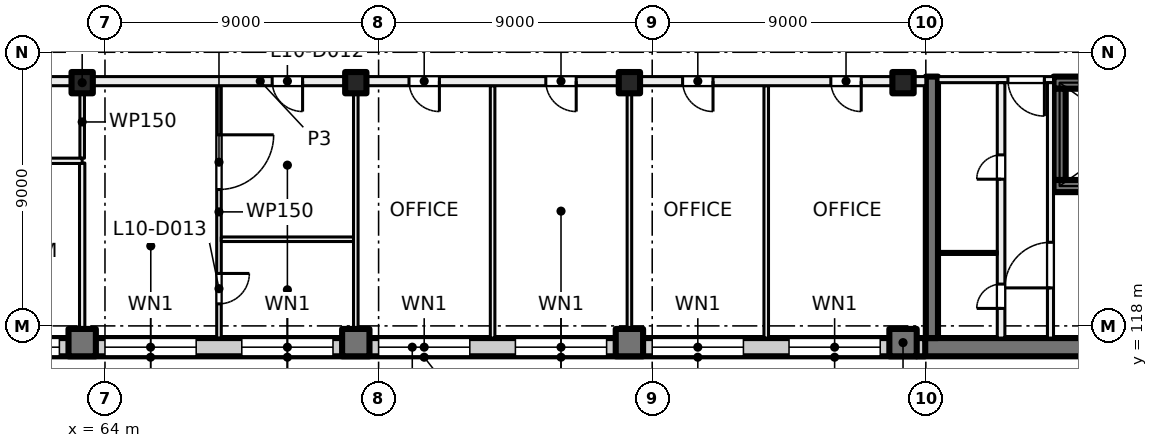
"""IFC4 building model, lengths in metres.
Left out: names, types, materials, properties, quantities, classifications, styles, units other than length and angle.
Written with IfcOpenShell. Run it as: python <this file> out.ifc"""

import sys

from ifc_helpers import new_model, si_unit, direction, frame, frame_2d, origin, origin_2d, place, context, subcontext, project, spatial, rectangle, extrude, element, fill, save


model = new_model("IFC4")
c1 = context("Model", 3, precision=1e-05, world=origin(), true_north=direction((0.0, 1.0)))
c2 = subcontext(c1, "Body", "Model", "MODEL_VIEW")
j1 = project(units=[si_unit("LENGTHUNIT", "METRE"), si_unit("PLANEANGLEUNIT", "RADIAN")], contexts=[c1])
p1 = place(None, origin())
s1 = spatial("IfcSite", under=j1, at=p1, CompositionType="ELEMENT")
p2 = place(p1, origin())
s2 = spatial("IfcBuilding", under=s1, at=p2, CompositionType="ELEMENT")
p3 = place(p2, frame((0.0, 0.0, 47.5)))
s3 = spatial("IfcBuildingStorey", under=s2, at=p3, CompositionType="ELEMENT", Elevation=47.5)
for number, where, z_axis, x_axis in (
    (1, (63.25, 126.0, 0.0), (0.0, 0.0, 1.0), (1.0, 0.0, 0.0)),
    (2, (72.25, 126.0, 0.0), (0.0, 0.0, 1.0), (1.0, 0.0, 0.0)),
    (3, (81.25, 126.0, 0.0), (0.0, 0.0, 1.0), (1.0, 0.0, 0.0)),
    (4, (90.25, 126.0, 0.0), (0.0, 0.0, 1.0), (1.0, 0.0, 0.0)),
):
    element("IfcColumn", number, at=place(p3, frame(where, z_axis=z_axis, x_axis=x_axis)), inside=s3, PredefinedType="COLUMN", context=c2, shape_type="SweptSolid", body=[
        extrude(rectangle(XDim=0.7, YDim=0.7, at=origin_2d()), origin(), (0.0, 0.0, 1.0), 4.0),
    ])
for number, where, z_axis, x_axis in (
    (5, (63.25, 117.45, 0.0), (0.0, 0.0, 1.0), (1.0, 0.0, 0.0)),
    (6, (72.25, 117.45, 0.0), (0.0, 0.0, 1.0), (1.0, 0.0, 0.0)),
    (7, (81.25, 117.45, 0.0), (0.0, 0.0, 1.0), (1.0, 0.0, 0.0)),
    (8, (90.25, 117.45, 0.0), (0.0, 0.0, 1.0), (1.0, 0.0, 0.0)),
):
    element("IfcColumn", number, at=place(p3, frame(where, z_axis=z_axis, x_axis=x_axis)), inside=s3, PredefinedType="COLUMN", context=c2, shape_type="SweptSolid", body=[
        extrude(rectangle(XDim=0.9, YDim=0.9, at=origin_2d()), origin(), (0.0, 0.0, 1.0), 4.0),
    ])
p4 = place(p3, frame((99.6, 117.3, 0.0), z_axis=(0.0, 0.0, 1.0), x_axis=(-1.0, 0.0, 0.0)))
e9 = element("IfcWall", 9, at=p4, inside=s3, PredefinedType="SHEAR", context=c2, shape_type="SweptSolid", body=[
    extrude(rectangle(XDim=8.9, YDim=0.6, at=frame_2d((4.45, 0.0))), origin(), (0.0, 0.0, 1.0), 4.0),
])
p5 = place(p3, frame((107.4, 126.0, 0.0), z_axis=(0.0, 0.0, 1.0), x_axis=(-1.0, 0.0, 0.0)))
e10 = element("IfcWall", 10, at=p5, inside=s3, PredefinedType="SHEAR", context=c2, shape_type="SweptSolid", body=[
    extrude(rectangle(XDim=12.2, YDim=0.4, at=frame_2d((6.1, 0.0))), origin(), (0.0, 0.0, 1.0), 4.0),
])
p6 = place(p5, frame((10.25, 0.0, 0.0)))
e11 = element("IfcOpeningElement", 11, at=p6, cuts=e10, PredefinedType="OPENING", context=c2, shape_type="SweptSolid", body=[
    extrude(rectangle(XDim=1.1, YDim=2.1, at=frame_2d((0.55, 1.05))), frame((0.0, 0.21, 0.0), z_axis=(0.0, -1.0, 0.0), x_axis=(1.0, 0.0, 0.0)), (0.0, 0.0, 1.0), 0.42),
])
p7 = place(p5, frame((0.6, 0.0, 0.0)))
e12 = element("IfcOpeningElement", 12, at=p7, cuts=e10, PredefinedType="OPENING", context=c2, shape_type="SweptSolid", body=[
    extrude(rectangle(XDim=1.0, YDim=2.1, at=frame_2d((0.5, 1.05))), frame((0.0, 0.21, 0.0), z_axis=(0.0, -1.0, 0.0), x_axis=(1.0, 0.0, 0.0)), (0.0, 0.0, 1.0), 0.42),
])
p8 = place(p3, frame((107.4, 122.6, 0.0), z_axis=(0.0, 0.0, 1.0), x_axis=(-1.0, 0.0, 0.0)))
e13 = element("IfcWall", 13, at=p8, inside=s3, PredefinedType="SHEAR", context=c2, shape_type="SweptSolid", body=[
    extrude(rectangle(XDim=12.2, YDim=0.4, at=frame_2d((6.1, 0.0))), origin(), (0.0, 0.0, 1.0), 4.0),
])
p9 = place(p8, frame((7.9, 0.0, 0.0)))
e14 = element("IfcOpeningElement", 14, at=p9, cuts=e13, PredefinedType="OPENING", context=c2, shape_type="SweptSolid", body=[
    extrude(rectangle(XDim=1.1, YDim=2.1, at=frame_2d((0.55, 1.05))), frame((0.0, 0.21, 0.0), z_axis=(0.0, -1.0, 0.0), x_axis=(1.0, 0.0, 0.0)), (0.0, 0.0, 1.0), 0.42),
])
p10 = place(p3, frame((95.4, 125.8, 0.0), z_axis=(0.0, 0.0, 1.0), x_axis=(0.0, -1.0, 0.0)))
e15 = element("IfcWall", 15, at=p10, inside=s3, PredefinedType="SHEAR", context=c2, shape_type="SweptSolid", body=[
    extrude(rectangle(XDim=3.0, YDim=0.4, at=frame_2d((1.5, 0.0))), origin(), (0.0, 0.0, 1.0), 4.0),
])
p11 = place(p3, frame((91.2, 126.2, 0.0), z_axis=(0.0, 0.0, 1.0), x_axis=(0.0, -1.0, 0.0)))
e16 = element("IfcWall", 16, at=p11, inside=s3, PredefinedType="SHEAR", context=c2, shape_type="SweptSolid", body=[
    extrude(rectangle(XDim=8.6, YDim=0.4, at=frame_2d((4.3, 0.0))), origin(), (0.0, 0.0, 1.0), 4.0),
])
p12 = place(p3, frame((90.98, 117.3, 0.0), z_axis=(0.0, 0.0, 1.0), x_axis=(-1.0, 0.0, 0.0)))
e17 = element("IfcWall", 17, at=p12, inside=s3, PredefinedType="SOLIDWALL", context=c2, shape_type="SweptSolid", body=[
    extrude(rectangle(XDim=33.745, YDim=0.6, at=frame_2d((16.873, 0.0))), origin(), (0.0, 0.0, 1.0), 3.625),
])
p13 = place(p12, frame((1.48, 0.0, 0.9)))
e18 = element("IfcOpeningElement", 18, at=p13, cuts=e17, PredefinedType="OPENING", context=c2, shape_type="SweptSolid", body=[
    extrude(rectangle(XDim=3.0, YDim=2.4, at=frame_2d((1.5, 1.2))), frame((0.0, 0.31, 0.0), z_axis=(0.0, -1.0, 0.0), x_axis=(1.0, 0.0, 0.0)), (0.0, 0.0, 1.0), 0.62),
])
p14 = place(p12, frame((5.98, 0.0, 0.9)))
e19 = element("IfcOpeningElement", 19, at=p14, cuts=e17, PredefinedType="OPENING", context=c2, shape_type="SweptSolid", body=[
    extrude(rectangle(XDim=3.0, YDim=2.4, at=frame_2d((1.5, 1.2))), frame((0.0, 0.31, 0.0), z_axis=(0.0, -1.0, 0.0), x_axis=(1.0, 0.0, 0.0)), (0.0, 0.0, 1.0), 0.62),
])
p15 = place(p12, frame((10.48, 0.0, 0.9)))
e20 = element("IfcOpeningElement", 20, at=p15, cuts=e17, PredefinedType="OPENING", context=c2, shape_type="SweptSolid", body=[
    extrude(rectangle(XDim=3.0, YDim=2.4, at=frame_2d((1.5, 1.2))), frame((0.0, 0.31, 0.0), z_axis=(0.0, -1.0, 0.0), x_axis=(1.0, 0.0, 0.0)), (0.0, 0.0, 1.0), 0.62),
])
p16 = place(p12, frame((14.98, 0.0, 0.9)))
e21 = element("IfcOpeningElement", 21, at=p16, cuts=e17, PredefinedType="OPENING", context=c2, shape_type="SweptSolid", body=[
    extrude(rectangle(XDim=3.0, YDim=2.4, at=frame_2d((1.5, 1.2))), frame((0.0, 0.31, 0.0), z_axis=(0.0, -1.0, 0.0), x_axis=(1.0, 0.0, 0.0)), (0.0, 0.0, 1.0), 0.62),
])
p17 = place(p12, frame((19.48, 0.0, 0.9)))
e22 = element("IfcOpeningElement", 22, at=p17, cuts=e17, PredefinedType="OPENING", context=c2, shape_type="SweptSolid", body=[
    extrude(rectangle(XDim=3.0, YDim=2.4, at=frame_2d((1.5, 1.2))), frame((0.0, 0.31, 0.0), z_axis=(0.0, -1.0, 0.0), x_axis=(1.0, 0.0, 0.0)), (0.0, 0.0, 1.0), 0.62),
])
p18 = place(p12, frame((23.98, 0.0, 0.9)))
e23 = element("IfcOpeningElement", 23, at=p18, cuts=e17, PredefinedType="OPENING", context=c2, shape_type="SweptSolid", body=[
    extrude(rectangle(XDim=3.0, YDim=2.4, at=frame_2d((1.5, 1.2))), frame((0.0, 0.31, 0.0), z_axis=(0.0, -1.0, 0.0), x_axis=(1.0, 0.0, 0.0)), (0.0, 0.0, 1.0), 0.62),
])
p19 = place(p12, frame((28.48, 0.0, 0.9)))
e24 = element("IfcOpeningElement", 24, at=p19, cuts=e17, PredefinedType="OPENING", context=c2, shape_type="SweptSolid", body=[
    extrude(rectangle(XDim=3.0, YDim=2.4, at=frame_2d((1.5, 1.2))), frame((0.0, 0.31, 0.0), z_axis=(0.0, -1.0, 0.0), x_axis=(1.0, 0.0, 0.0)), (0.0, 0.0, 1.0), 0.62),
])
p20 = place(p3, frame((95.2, 126.1, 0.0), z_axis=(0.0, 0.0, 1.0), x_axis=(-1.0, 0.0, 0.0)))
e25 = element("IfcWall", 25, at=p20, inside=s3, PredefinedType="PARTITIONING", context=c2, shape_type="SweptSolid", body=[
    extrude(rectangle(XDim=3.8, YDim=0.2, at=frame_2d((1.9, 0.0))), origin(), (0.0, 0.0, 1.0), 3.625),
])
p21 = place(p20, frame((0.3, 0.0, 0.0)))
e26 = element("IfcOpeningElement", 26, at=p21, cuts=e25, PredefinedType="OPENING", context=c2, shape_type="SweptSolid", body=[
    extrude(rectangle(XDim=1.2, YDim=2.1, at=frame_2d((0.6, 1.05))), frame((0.0, 0.11, 0.0), z_axis=(0.0, -1.0, 0.0), x_axis=(1.0, 0.0, 0.0)), (0.0, 0.0, 1.0), 0.22),
])
p22 = place(p3, frame((95.1, 117.6, 0.0), z_axis=(0.0, 0.0, 1.0), x_axis=(0.0, 1.0, 0.0)))
e27 = element("IfcWall", 27, at=p22, inside=s3, PredefinedType="PARTITIONING", context=c2, shape_type="SweptSolid", body=[
    extrude(rectangle(XDim=8.4, YDim=0.2, at=frame_2d((4.2, 0.0))), origin(), (0.0, 0.0, 1.0), 3.625),
])
p23 = place(p22, frame((1.65, 0.0, 0.0)))
e28 = element("IfcOpeningElement", 28, at=p23, cuts=e27, PredefinedType="OPENING", context=c2, shape_type="SweptSolid", body=[
    extrude(rectangle(XDim=1.5, YDim=2.1, at=frame_2d((0.75, 1.05))), frame((0.0, 0.11, 0.0), z_axis=(0.0, -1.0, 0.0), x_axis=(1.0, 0.0, 0.0)), (0.0, 0.0, 1.0), 0.22),
])
p24 = place(p3, frame((93.475, 117.6, 0.0), z_axis=(0.0, 0.0, 1.0), x_axis=(0.0, 1.0, 0.0)))
e29 = element("IfcWall", 29, at=p24, inside=s3, PredefinedType="PARTITIONING", context=c2, shape_type="SweptSolid", body=[
    extrude(rectangle(XDim=8.4, YDim=0.25, at=frame_2d((4.2, 0.0))), origin(), (0.0, 0.0, 1.0), 3.625),
])
p25 = place(p24, frame((5.225, 0.0, 0.0)))
e30 = element("IfcOpeningElement", 30, at=p25, cuts=e29, PredefinedType="OPENING", context=c2, shape_type="SweptSolid", body=[
    extrude(rectangle(XDim=0.8, YDim=2.1, at=frame_2d((0.4, 1.05))), frame((0.0, 0.135, 0.0), z_axis=(0.0, -1.0, 0.0), x_axis=(1.0, 0.0, 0.0)), (0.0, 0.0, 1.0), 0.27),
])
p26 = place(p24, frame((0.975, 0.0, 0.0)))
e31 = element("IfcOpeningElement", 31, at=p26, cuts=e29, PredefinedType="OPENING", context=c2, shape_type="SweptSolid", body=[
    extrude(rectangle(XDim=0.8, YDim=2.1, at=frame_2d((0.4, 1.05))), frame((0.0, 0.135, 0.0), z_axis=(0.0, -1.0, 0.0), x_axis=(1.0, 0.0, 0.0)), (0.0, 0.0, 1.0), 0.27),
])
p27 = place(p3, frame((93.35, 120.4, 0.0), z_axis=(0.0, 0.0, 1.0), x_axis=(-1.0, 0.0, 0.0)))
e32 = element("IfcWall", 32, at=p27, inside=s3, PredefinedType="PARTITIONING", context=c2, shape_type="SweptSolid", body=[
    extrude(rectangle(XDim=1.95, YDim=0.1, at=frame_2d((0.975, 0.0))), origin(), (0.0, 0.0, 1.0), 3.625),
])
p28 = place(p3, frame((63.25, 117.6, 0.0), z_axis=(0.0, 0.0, 1.0), x_axis=(0.0, 1.0, 0.0)))
e33 = element("IfcWall", 33, at=p28, inside=s3, PredefinedType="PARTITIONING", context=c2, shape_type="SweptSolid", body=[
    extrude(rectangle(XDim=5.758, YDim=0.175, at=frame_2d((2.879, 0.0))), origin(), (0.0, 0.0, 1.0), 3.625),
])
p29 = place(p3, frame((63.25, 123.515, 0.0), z_axis=(0.0, 0.0, 1.0), x_axis=(0.0, 1.0, 0.0)))
e34 = element("IfcWall", 34, at=p29, inside=s3, PredefinedType="PARTITIONING", context=c2, shape_type="SweptSolid", body=[
    extrude(rectangle(XDim=2.385, YDim=0.15, at=frame_2d((1.192, 0.0))), origin(), (0.0, 0.0, 1.0), 3.625),
])
p30 = place(p3, frame((54.162, 123.43, 0.0), z_axis=(0.0, 0.0, 1.0), x_axis=(1.0, 0.0, 0.0)))
e35 = element("IfcWall", 35, at=p30, inside=s3, PredefinedType="PARTITIONING", context=c2, shape_type="SweptSolid", body=[
    extrude(rectangle(XDim=9.088, YDim=0.175, at=frame_2d((4.544, 0.0))), origin(), (0.0, 0.0, 1.0), 3.625),
])
p31 = place(p30, frame((3.988, 0.0, 0.0)))
e36 = element("IfcOpeningElement", 36, at=p31, cuts=e35, PredefinedType="OPENING", context=c2, shape_type="SweptSolid", body=[
    extrude(rectangle(XDim=1.2, YDim=2.1, at=frame_2d((0.6, 1.05))), frame((0.0, 0.097, 0.0), z_axis=(0.0, -1.0, 0.0), x_axis=(1.0, 0.0, 0.0)), (0.0, 0.0, 1.0), 0.195),
])
p32 = place(p3, frame((67.75, 125.9, 0.0), z_axis=(0.0, 0.0, 1.0), x_axis=(0.0, -1.0, 0.0)))
e37 = element("IfcWall", 37, at=p32, inside=s3, PredefinedType="PARTITIONING", context=c2, shape_type="SweptSolid", body=[
    extrude(rectangle(XDim=8.3, YDim=0.15, at=frame_2d((4.15, 0.0))), origin(), (0.0, 0.0, 1.0), 3.625),
])
p33 = place(p32, frame((6.175, 0.0, 0.0)))
e38 = element("IfcOpeningElement", 38, at=p33, cuts=e37, PredefinedType="OPENING", context=c2, shape_type="SweptSolid", body=[
    extrude(rectangle(XDim=1.0, YDim=2.1, at=frame_2d((0.5, 1.05))), frame((0.0, 0.085, 0.0), z_axis=(0.0, -1.0, 0.0), x_axis=(1.0, 0.0, 0.0)), (0.0, 0.0, 1.0), 0.17),
])
p34 = place(p32, frame((1.615, 0.0, 0.0)))
e39 = element("IfcOpeningElement", 39, at=p34, cuts=e37, PredefinedType="OPENING", context=c2, shape_type="SweptSolid", body=[
    extrude(rectangle(XDim=1.8, YDim=2.1, at=frame_2d((0.9, 1.05))), frame((0.0, 0.085, 0.0), z_axis=(0.0, -1.0, 0.0), x_axis=(1.0, 0.0, 0.0)), (0.0, 0.0, 1.0), 0.17),
])
p35 = place(p3, frame((67.825, 120.85, 0.0), z_axis=(0.0, 0.0, 1.0), x_axis=(1.0, 0.0, 0.0)))
e40 = element("IfcWall", 40, at=p35, inside=s3, PredefinedType="PARTITIONING", context=c2, shape_type="SweptSolid", body=[
    extrude(rectangle(XDim=4.35, YDim=0.15, at=frame_2d((2.175, 0.0))), origin(), (0.0, 0.0, 1.0), 3.625),
])
for number, where, z_axis, x_axis in (
    (41, (72.25, 117.6, 0.0), (0.0, 0.0, 1.0), (0.0, 1.0, 0.0)),
    (42, (76.75, 117.6, 0.0), (0.0, 0.0, 1.0), (0.0, 1.0, 0.0)),
    (43, (81.25, 117.6, 0.0), (0.0, 0.0, 1.0), (0.0, 1.0, 0.0)),
    (44, (85.75, 117.6, 0.0), (0.0, 0.0, 1.0), (0.0, 1.0, 0.0)),
):
    element("IfcWall", number, at=place(p3, frame(where, z_axis=z_axis, x_axis=x_axis)), inside=s3, PredefinedType="PARTITIONING", context=c2, shape_type="SweptSolid", body=[
        extrude(rectangle(XDim=8.3, YDim=0.15, at=frame_2d((4.15, 0.0))), origin(), (0.0, 0.0, 1.0), 3.625),
    ])
p36 = place(p3, frame((91.0, 126.05, 0.0), z_axis=(0.0, 0.0, 1.0), x_axis=(-1.0, 0.0, 0.0)))
e45 = element("IfcWall", 45, at=p36, inside=s3, PredefinedType="PARTITIONING", context=c2, shape_type="SweptSolid", body=[
    extrude(rectangle(XDim=43.785, YDim=0.3, at=frame_2d((21.893, 0.0))), origin(), (0.0, 0.0, 1.0), 3.625),
])
p37 = place(p36, frame((2.125, 0.0, 0.0)))
e46 = element("IfcOpeningElement", 46, at=p37, cuts=e45, PredefinedType="OPENING", context=c2, shape_type="SweptSolid", body=[
    extrude(rectangle(XDim=1.0, YDim=2.1, at=frame_2d((0.5, 1.05))), frame((0.0, 0.16, 0.0), z_axis=(0.0, -1.0, 0.0), x_axis=(1.0, 0.0, 0.0)), (0.0, 0.0, 1.0), 0.32),
])
p38 = place(p36, frame((7.0, 0.0, 0.0)))
e47 = element("IfcOpeningElement", 47, at=p38, cuts=e45, PredefinedType="OPENING", context=c2, shape_type="SweptSolid", body=[
    extrude(rectangle(XDim=1.0, YDim=2.1, at=frame_2d((0.5, 1.05))), frame((0.0, 0.16, 0.0), z_axis=(0.0, -1.0, 0.0), x_axis=(1.0, 0.0, 0.0)), (0.0, 0.0, 1.0), 0.32),
])
p39 = place(p36, frame((11.5, 0.0, 0.0)))
e48 = element("IfcOpeningElement", 48, at=p39, cuts=e45, PredefinedType="OPENING", context=c2, shape_type="SweptSolid", body=[
    extrude(rectangle(XDim=1.0, YDim=2.1, at=frame_2d((0.5, 1.05))), frame((0.0, 0.16, 0.0), z_axis=(0.0, -1.0, 0.0), x_axis=(1.0, 0.0, 0.0)), (0.0, 0.0, 1.0), 0.32),
])
p40 = place(p36, frame((16.0, 0.0, 0.0)))
e49 = element("IfcOpeningElement", 49, at=p40, cuts=e45, PredefinedType="OPENING", context=c2, shape_type="SweptSolid", body=[
    extrude(rectangle(XDim=1.0, YDim=2.1, at=frame_2d((0.5, 1.05))), frame((0.0, 0.16, 0.0), z_axis=(0.0, -1.0, 0.0), x_axis=(1.0, 0.0, 0.0)), (0.0, 0.0, 1.0), 0.32),
])
p41 = place(p36, frame((20.5, 0.0, 0.0)))
e50 = element("IfcOpeningElement", 50, at=p41, cuts=e45, PredefinedType="OPENING", context=c2, shape_type="SweptSolid", body=[
    extrude(rectangle(XDim=1.0, YDim=2.1, at=frame_2d((0.5, 1.05))), frame((0.0, 0.16, 0.0), z_axis=(0.0, -1.0, 0.0), x_axis=(1.0, 0.0, 0.0)), (0.0, 0.0, 1.0), 0.32),
])
p42 = place(p36, frame((31.75, 0.0, 0.0)))
e51 = element("IfcOpeningElement", 51, at=p42, cuts=e45, PredefinedType="OPENING", context=c2, shape_type="SweptSolid", body=[
    extrude(rectangle(XDim=1.0, YDim=2.1, at=frame_2d((0.5, 1.05))), frame((0.0, 0.16, 0.0), z_axis=(0.0, -1.0, 0.0), x_axis=(1.0, 0.0, 0.0)), (0.0, 0.0, 1.0), 0.32),
])
p43 = place(p36, frame((39.296, 0.0, 0.0)))
e52 = element("IfcOpeningElement", 52, at=p43, cuts=e45, PredefinedType="OPENING", context=c2, shape_type="SweptSolid", body=[
    extrude(rectangle(XDim=1.8, YDim=2.1, at=frame_2d((0.9, 1.05))), frame((0.0, 0.16, 0.0), z_axis=(0.0, -1.0, 0.0), x_axis=(1.0, 0.0, 0.0)), (0.0, 0.0, 1.0), 0.32),
])
p44 = place(p13, origin())
e53 = element("IfcWindow", 53, at=p44, inside=s3, PartitioningType="SINGLE_PANEL", PredefinedType="WINDOW", context=c2, shape_type="SweptSolid", body=[
    extrude(rectangle(XDim=3.0, YDim=2.4, at=frame_2d((1.5, 1.2))), frame((0.0, 0.03, 0.0), z_axis=(0.0, -1.0, 0.0), x_axis=(1.0, 0.0, 0.0)), (0.0, 0.0, 1.0), 0.06),
])
fill(e18, e53)
p45 = place(p14, origin())
e54 = element("IfcWindow", 54, at=p45, inside=s3, PartitioningType="SINGLE_PANEL", PredefinedType="WINDOW", context=c2, shape_type="SweptSolid", body=[
    extrude(rectangle(XDim=3.0, YDim=2.4, at=frame_2d((1.5, 1.2))), frame((0.0, 0.03, 0.0), z_axis=(0.0, -1.0, 0.0), x_axis=(1.0, 0.0, 0.0)), (0.0, 0.0, 1.0), 0.06),
])
fill(e19, e54)
p46 = place(p15, origin())
e55 = element("IfcWindow", 55, at=p46, inside=s3, PartitioningType="SINGLE_PANEL", PredefinedType="WINDOW", context=c2, shape_type="SweptSolid", body=[
    extrude(rectangle(XDim=3.0, YDim=2.4, at=frame_2d((1.5, 1.2))), frame((0.0, 0.03, 0.0), z_axis=(0.0, -1.0, 0.0), x_axis=(1.0, 0.0, 0.0)), (0.0, 0.0, 1.0), 0.06),
])
fill(e20, e55)
p47 = place(p16, origin())
e56 = element("IfcWindow", 56, at=p47, inside=s3, PartitioningType="SINGLE_PANEL", PredefinedType="WINDOW", context=c2, shape_type="SweptSolid", body=[
    extrude(rectangle(XDim=3.0, YDim=2.4, at=frame_2d((1.5, 1.2))), frame((0.0, 0.03, 0.0), z_axis=(0.0, -1.0, 0.0), x_axis=(1.0, 0.0, 0.0)), (0.0, 0.0, 1.0), 0.06),
])
fill(e21, e56)
p48 = place(p17, origin())
e57 = element("IfcWindow", 57, at=p48, inside=s3, PartitioningType="SINGLE_PANEL", PredefinedType="WINDOW", context=c2, shape_type="SweptSolid", body=[
    extrude(rectangle(XDim=3.0, YDim=2.4, at=frame_2d((1.5, 1.2))), frame((0.0, 0.03, 0.0), z_axis=(0.0, -1.0, 0.0), x_axis=(1.0, 0.0, 0.0)), (0.0, 0.0, 1.0), 0.06),
])
fill(e22, e57)
p49 = place(p18, origin())
e58 = element("IfcWindow", 58, at=p49, inside=s3, PartitioningType="SINGLE_PANEL", PredefinedType="WINDOW", context=c2, shape_type="SweptSolid", body=[
    extrude(rectangle(XDim=3.0, YDim=2.4, at=frame_2d((1.5, 1.2))), frame((0.0, 0.03, 0.0), z_axis=(0.0, -1.0, 0.0), x_axis=(1.0, 0.0, 0.0)), (0.0, 0.0, 1.0), 0.06),
])
fill(e23, e58)
p50 = place(p19, origin())
e59 = element("IfcWindow", 59, at=p50, inside=s3, PartitioningType="SINGLE_PANEL", PredefinedType="WINDOW", context=c2, shape_type="SweptSolid", body=[
    extrude(rectangle(XDim=3.0, YDim=2.4, at=frame_2d((1.5, 1.2))), frame((0.0, 0.03, 0.0), z_axis=(0.0, -1.0, 0.0), x_axis=(1.0, 0.0, 0.0)), (0.0, 0.0, 1.0), 0.06),
])
fill(e24, e59)
p51 = place(p21, origin())
e60 = element("IfcDoor", 60, at=p51, inside=s3, OperationType="DOUBLE_DOOR_SINGLE_SWING", PredefinedType="DOOR", context=c2, shape_type="SweptSolid", body=[
    extrude(rectangle(XDim=1.2, YDim=2.1, at=frame_2d((0.6, 1.05))), frame((0.0, 0.025, 0.0), z_axis=(0.0, -1.0, 0.0), x_axis=(1.0, 0.0, 0.0)), (0.0, 0.0, 1.0), 0.05),
])
fill(e26, e60)
p52 = place(p23, origin())
e61 = element("IfcDoor", 61, at=p52, inside=s3, OperationType="DOUBLE_DOOR_SINGLE_SWING", PredefinedType="DOOR", context=c2, shape_type="SweptSolid", body=[
    extrude(rectangle(XDim=1.5, YDim=2.1, at=frame_2d((0.75, 1.05))), frame((0.0, 0.025, 0.0), z_axis=(0.0, -1.0, 0.0), x_axis=(1.0, 0.0, 0.0)), (0.0, 0.0, 1.0), 0.05),
])
fill(e28, e61)
p53 = place(p25, origin())
e62 = element("IfcDoor", 62, at=p53, inside=s3, OperationType="SINGLE_SWING_LEFT", PredefinedType="DOOR", context=c2, shape_type="SweptSolid", body=[
    extrude(rectangle(XDim=0.8, YDim=2.1, at=frame_2d((0.4, 1.05))), frame((0.0, 0.025, 0.0), z_axis=(0.0, -1.0, 0.0), x_axis=(1.0, 0.0, 0.0)), (0.0, 0.0, 1.0), 0.05),
])
fill(e30, e62)
p54 = place(p26, origin())
e63 = element("IfcDoor", 63, at=p54, inside=s3, OperationType="SINGLE_SWING_RIGHT", PredefinedType="DOOR", context=c2, shape_type="SweptSolid", body=[
    extrude(rectangle(XDim=0.8, YDim=2.1, at=frame_2d((0.4, 1.05))), frame((0.0, 0.025, 0.0), z_axis=(0.0, -1.0, 0.0), x_axis=(1.0, 0.0, 0.0)), (0.0, 0.0, 1.0), 0.05),
])
fill(e31, e63)
p55 = place(p37, origin())
e64 = element("IfcDoor", 64, at=p55, inside=s3, OperationType="SINGLE_SWING_LEFT", PredefinedType="DOOR", context=c2, shape_type="SweptSolid", body=[
    extrude(rectangle(XDim=1.0, YDim=2.1, at=frame_2d((0.5, 1.05))), frame((0.0, 0.025, 0.0), z_axis=(0.0, -1.0, 0.0), x_axis=(1.0, 0.0, 0.0)), (0.0, 0.0, 1.0), 0.05),
])
fill(e46, e64)
p56 = place(p38, origin())
e65 = element("IfcDoor", 65, at=p56, inside=s3, OperationType="SINGLE_SWING_RIGHT", PredefinedType="DOOR", context=c2, shape_type="SweptSolid", body=[
    extrude(rectangle(XDim=1.0, YDim=2.1, at=frame_2d((0.5, 1.05))), frame((0.0, 0.025, 0.0), z_axis=(0.0, -1.0, 0.0), x_axis=(1.0, 0.0, 0.0)), (0.0, 0.0, 1.0), 0.05),
])
fill(e47, e65)
p57 = place(p39, origin())
e66 = element("IfcDoor", 66, at=p57, inside=s3, OperationType="SINGLE_SWING_LEFT", PredefinedType="DOOR", context=c2, shape_type="SweptSolid", body=[
    extrude(rectangle(XDim=1.0, YDim=2.1, at=frame_2d((0.5, 1.05))), frame((0.0, 0.025, 0.0), z_axis=(0.0, -1.0, 0.0), x_axis=(1.0, 0.0, 0.0)), (0.0, 0.0, 1.0), 0.05),
])
fill(e48, e66)
p58 = place(p40, origin())
e67 = element("IfcDoor", 67, at=p58, inside=s3, OperationType="SINGLE_SWING_LEFT", PredefinedType="DOOR", context=c2, shape_type="SweptSolid", body=[
    extrude(rectangle(XDim=1.0, YDim=2.1, at=frame_2d((0.5, 1.05))), frame((0.0, 0.025, 0.0), z_axis=(0.0, -1.0, 0.0), x_axis=(1.0, 0.0, 0.0)), (0.0, 0.0, 1.0), 0.05),
])
fill(e49, e67)
p59 = place(p41, origin())
e68 = element("IfcDoor", 68, at=p59, inside=s3, OperationType="SINGLE_SWING_LEFT", PredefinedType="DOOR", context=c2, shape_type="SweptSolid", body=[
    extrude(rectangle(XDim=1.0, YDim=2.1, at=frame_2d((0.5, 1.05))), frame((0.0, 0.025, 0.0), z_axis=(0.0, -1.0, 0.0), x_axis=(1.0, 0.0, 0.0)), (0.0, 0.0, 1.0), 0.05),
])
fill(e50, e68)
p60 = place(p33, origin())
e69 = element("IfcDoor", 69, at=p60, inside=s3, OperationType="SINGLE_SWING_RIGHT", PredefinedType="DOOR", context=c2, shape_type="SweptSolid", body=[
    extrude(rectangle(XDim=1.0, YDim=2.1, at=frame_2d((0.5, 1.05))), frame((0.0, 0.025, 0.0), z_axis=(0.0, -1.0, 0.0), x_axis=(1.0, 0.0, 0.0)), (0.0, 0.0, 1.0), 0.05),
])
fill(e38, e69)
p61 = place(p34, origin())
e70 = element("IfcDoor", 70, at=p61, inside=s3, OperationType="DOUBLE_DOOR_SINGLE_SWING", PredefinedType="DOOR", context=c2, shape_type="SweptSolid", body=[
    extrude(rectangle(XDim=1.8, YDim=2.1, at=frame_2d((0.9, 1.05))), frame((0.0, 0.025, 0.0), z_axis=(0.0, -1.0, 0.0), x_axis=(1.0, 0.0, 0.0)), (0.0, 0.0, 1.0), 0.05),
])
fill(e39, e70)
save(model, sys.argv[1])
